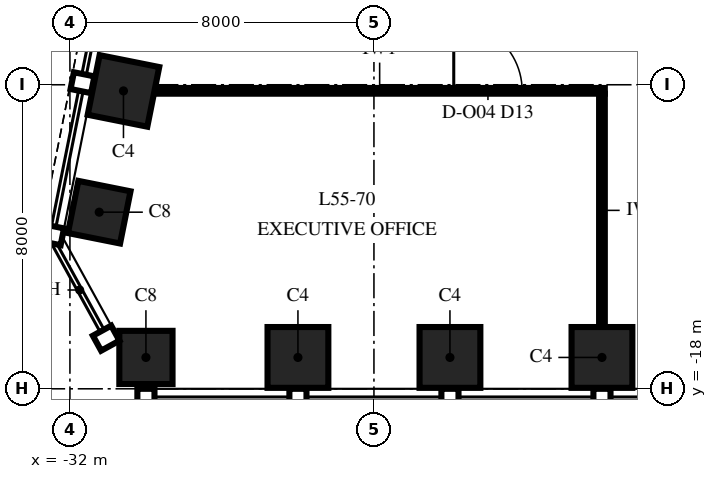
"""IFC4 building model, lengths in metres.
Left out: names, types, materials, properties, quantities, classifications, styles, units other than length and angle.
Written with IfcOpenShell. Run it as: python <this file> out.ifc"""

import sys

from ifc_helpers import new_model, si_unit, direction, frame, frame_2d, origin, origin_2d, place, context, subcontext, project, spatial, rectangle, extrude, element, fill, save


model = new_model("IFC4")
c1 = context("Model", 3, precision=1e-05, world=origin(), true_north=direction((0.0, 1.0)))
c2 = subcontext(c1, "Body", "Model", "MODEL_VIEW")
j1 = project(units=[si_unit("LENGTHUNIT", "METRE"), si_unit("PLANEANGLEUNIT", "RADIAN")], contexts=[c1])
p1 = place(None, origin())
s1 = spatial("IfcSite", under=j1, at=p1, CompositionType="ELEMENT")
p2 = place(p1, origin())
s2 = spatial("IfcBuilding", under=s1, at=p2, CompositionType="ELEMENT")
p3 = place(p2, frame((0.0, 0.0, 238.0)))
s3 = spatial("IfcBuildingStorey", under=s2, at=p3, CompositionType="ELEMENT", Elevation=238.0)
p4 = place(p3, frame((-30.0, -17.175, 0.0), z_axis=(0.0, 0.0, 1.0), x_axis=(1.0, 0.0, 0.0)))
e1 = element("IfcColumn", 1, at=p4, inside=s3, PredefinedType="COLUMN", context=c2, shape_type="SweptSolid", body=[
    extrude(rectangle(XDim=1.4, YDim=1.4, at=origin_2d()), origin(), (0.0, 0.0, 1.0), 4.0),
])
for number, where, z_axis, x_axis in (
    (2, (-26.0, -17.175, 0.0), (0.0, 0.0, 1.0), (1.0, 0.0, 0.0)),
    (3, (-22.0, -17.175, 0.0), (0.0, 0.0, 1.0), (1.0, 0.0, 0.0)),
    (4, (-18.0, -17.175, 0.0), (0.0, 0.0, 1.0), (1.0, 0.0, 0.0)),
    (5, (-30.591, -10.162, 0.0), (0.0, 0.0, 1.0), (-0.196, -0.981, 0.0)),
):
    element("IfcColumn", number, at=place(p3, frame(where, z_axis=z_axis, x_axis=x_axis)), inside=s3, PredefinedType="COLUMN", context=c2, shape_type="SweptSolid", body=[
        extrude(rectangle(XDim=1.6, YDim=1.6, at=origin_2d()), origin(), (0.0, 0.0, 1.0), 4.0),
    ])
p5 = place(p3, frame((-31.229, -13.353, 0.0), z_axis=(0.0, 0.0, 1.0), x_axis=(-0.196116135138, -0.980580675691, 0.0)))
e6 = element("IfcColumn", 6, at=p5, inside=s3, PredefinedType="COLUMN", context=c2, shape_type="SweptSolid", body=[
    extrude(rectangle(XDim=1.4, YDim=1.4, at=origin_2d()), origin(), (0.0, 0.0, 1.0), 4.0),
])
p6 = place(p3, frame((-29.775, -10.16, 0.0), z_axis=(0.0, 0.0, 1.0), x_axis=(1.0, 0.0, 0.0)))
e7 = element("IfcWall", 7, at=p6, inside=s3, PredefinedType="PARTITIONING", context=c2, shape_type="SweptSolid", body=[
    extrude(rectangle(XDim=11.85, YDim=0.15, at=frame_2d((5.925, 0.0))), origin(), (0.0, 0.0, 1.0), 3.13),
])
p7 = place(p6, frame((7.875, 0.0, 0.0)))
e8 = element("IfcOpeningElement", 8, at=p7, cuts=e7, PredefinedType="OPENING", context=c2, shape_type="SweptSolid", body=[
    extrude(rectangle(XDim=1.8, YDim=2.4, at=frame_2d((0.9, 1.2))), frame((0.0, 0.09, 0.0), z_axis=(0.0, -1.0, 0.0), x_axis=(1.0, 0.0, 0.0)), (0.0, 0.0, 1.0), 0.18),
])
p8 = place(p3, frame((-18.0, -16.375, 0.0), z_axis=(0.0, 0.0, 1.0), x_axis=(0.0, 1.0, 0.0)))
e9 = element("IfcWall", 9, at=p8, inside=s3, PredefinedType="PARTITIONING", context=c2, shape_type="SweptSolid", body=[
    extrude(rectangle(XDim=6.14, YDim=0.15, at=frame_2d((3.07, 0.0))), origin(), (0.0, 0.0, 1.0), 3.13),
])
p9 = place(p7, origin())
e10 = element("IfcDoor", 10, at=p9, inside=s3, OperationType="DOUBLE_DOOR_SINGLE_SWING", PredefinedType="DOOR", context=c2, shape_type="SweptSolid", body=[
    extrude(rectangle(XDim=1.8, YDim=2.4, at=frame_2d((0.9, 1.2))), frame((0.0, 0.075, 0.0), z_axis=(0.0, -1.0, 0.0), x_axis=(1.0, 0.0, 0.0)), (0.0, 0.0, 1.0), 0.149),
])
fill(e8, e10)
save(model, sys.argv[1])
